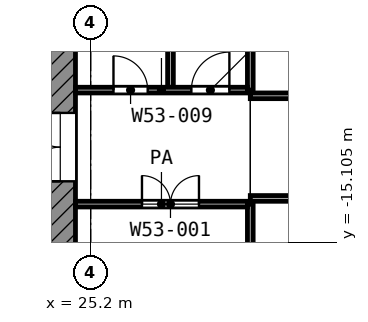
"""IFC4 building model, lengths in metres.
Left out: names, types, materials, properties, quantities, classifications, styles, units other than length and angle.
Written with IfcOpenShell. Run it as: python <this file> out.ifc"""

import sys

from ifc_helpers import new_model, si_unit, direction, frame, frame_2d, origin, place, context, subcontext, project, spatial, rectangle, extrude, element, fill, save


model = new_model("IFC4")
c1 = context("Model", 3, precision=1e-05, world=origin(), true_north=direction((0.0, 1.0)))
c2 = subcontext(c1, "Body", "Model", "MODEL_VIEW")
j1 = project(units=[si_unit("LENGTHUNIT", "METRE"), si_unit("PLANEANGLEUNIT", "RADIAN")], contexts=[c1])
p1 = place(None, origin())
s1 = spatial("IfcSite", under=j1, at=p1, CompositionType="ELEMENT")
p2 = place(p1, origin())
s2 = spatial("IfcBuilding", under=s1, at=p2, CompositionType="ELEMENT")
p3 = place(p2, frame((0.0, 0.0, 251.6)))
s3 = spatial("IfcBuildingStorey", under=s2, at=p3, CompositionType="ELEMENT", Elevation=251.6)
p4 = place(p3, frame((24.4, -24.0, 0.0), z_axis=(0.0, 0.0, 1.0), x_axis=(0.0, 1.0, 0.0)))
e1 = element("IfcWall", 1, at=p4, inside=s3, PredefinedType="SHEAR", context=c2, shape_type="SweptSolid", body=[
    extrude(rectangle(XDim=18.6, YDim=0.8, at=frame_2d((9.3, 0.0))), origin(), (0.0, 0.0, 1.0), 3.6),
])
p5 = place(p4, frame((10.5, 0.0, 0.0)))
e2 = element("IfcOpeningElement", 2, at=p5, cuts=e1, PredefinedType="OPENING", context=c2, shape_type="SweptSolid", body=[
    extrude(rectangle(XDim=1.8, YDim=2.1, at=frame_2d((0.9, 1.05))), frame((0.0, 0.41, 0.0), z_axis=(0.0, -1.0, 0.0), x_axis=(1.0, 0.0, 0.0)), (0.0, 0.0, 1.0), 0.82),
])
p6 = place(p3, frame((24.8, -14.1, 0.0), z_axis=(0.0, 0.0, 1.0), x_axis=(1.0, 0.0, 0.0)))
e3 = element("IfcWall", 3, at=p6, inside=s3, PredefinedType="PARTITIONING", context=c2, shape_type="SweptSolid", body=[
    extrude(rectangle(XDim=4.525, YDim=0.15, at=frame_2d((2.262, 0.0))), origin(), (0.0, 0.0, 1.0), 3.6),
])
p7 = place(p6, frame((1.75, 0.0, 0.0)))
e4 = element("IfcOpeningElement", 4, at=p7, cuts=e3, PredefinedType="OPENING", context=c2, shape_type="SweptSolid", body=[
    extrude(rectangle(XDim=1.5, YDim=2.1, at=frame_2d((0.75, 1.05))), frame((0.0, 0.085, 0.0), z_axis=(0.0, -1.0, 0.0), x_axis=(1.0, 0.0, 0.0)), (0.0, 0.0, 1.0), 0.17),
])
p8 = place(p3, frame((29.4, -13.95, 0.0), z_axis=(0.0, 0.0, 1.0), x_axis=(1.0, 0.0, 0.0)))
e5 = element("IfcWall", 5, at=p8, inside=s3, PredefinedType="PARTITIONING", context=c2, shape_type="SweptSolid", body=[
    extrude(rectangle(XDim=33.52, YDim=0.15, at=frame_2d((16.76, 0.0))), origin(), (0.0, 0.0, 1.0), 2.7),
])
p9 = place(p8, frame((1.5, 0.0, 0.0)))
e6 = element("IfcOpeningElement", 6, at=p9, cuts=e5, PredefinedType="OPENING", context=c2, shape_type="SweptSolid", body=[
    extrude(rectangle(XDim=1.2, YDim=2.1, at=frame_2d((0.6, 1.05))), frame((0.0, 0.085, 0.0), z_axis=(0.0, -1.0, 0.0), x_axis=(1.0, 0.0, 0.0)), (0.0, 0.0, 1.0), 0.17),
])
p10 = place(p8, frame((6.1, 0.0, 0.0)))
e7 = element("IfcOpeningElement", 7, at=p10, cuts=e5, PredefinedType="OPENING", context=c2, shape_type="SweptSolid", body=[
    extrude(rectangle(XDim=1.0, YDim=2.1, at=frame_2d((0.5, 1.05))), frame((0.0, 0.085, 0.0), z_axis=(0.0, -1.0, 0.0), x_axis=(1.0, 0.0, 0.0)), (0.0, 0.0, 1.0), 0.17),
])
p11 = place(p8, frame((11.3, 0.0, 0.0)))
e8 = element("IfcOpeningElement", 8, at=p11, cuts=e5, PredefinedType="OPENING", context=c2, shape_type="SweptSolid", body=[
    extrude(rectangle(XDim=1.1, YDim=2.1, at=frame_2d((0.55, 1.05))), frame((0.0, 0.085, 0.0), z_axis=(0.0, -1.0, 0.0), x_axis=(1.0, 0.0, 0.0)), (0.0, 0.0, 1.0), 0.17),
])
p12 = place(p8, frame((13.0, 0.0, 0.0)))
e9 = element("IfcOpeningElement", 9, at=p12, cuts=e5, PredefinedType="OPENING", context=c2, shape_type="SweptSolid", body=[
    extrude(rectangle(XDim=1.2, YDim=2.1, at=frame_2d((0.6, 1.05))), frame((0.0, 0.085, 0.0), z_axis=(0.0, -1.0, 0.0), x_axis=(1.0, 0.0, 0.0)), (0.0, 0.0, 1.0), 0.17),
])
p13 = place(p8, frame((22.6, 0.0, 0.0)))
e10 = element("IfcOpeningElement", 10, at=p13, cuts=e5, PredefinedType="OPENING", context=c2, shape_type="SweptSolid", body=[
    extrude(rectangle(XDim=1.2, YDim=2.1, at=frame_2d((0.6, 1.05))), frame((0.0, 0.085, 0.0), z_axis=(0.0, -1.0, 0.0), x_axis=(1.0, 0.0, 0.0)), (0.0, 0.0, 1.0), 0.17),
])
p14 = place(p8, frame((20.3, 0.0, 0.0)))
e11 = element("IfcOpeningElement", 11, at=p14, cuts=e5, PredefinedType="OPENING", context=c2, shape_type="SweptSolid", body=[
    extrude(rectangle(XDim=1.2, YDim=2.1, at=frame_2d((0.6, 1.05))), frame((0.0, 0.085, 0.0), z_axis=(0.0, -1.0, 0.0), x_axis=(1.0, 0.0, 0.0)), (0.0, 0.0, 1.0), 0.17),
])
p15 = place(p8, frame((28.0, 0.0, 0.0)))
e12 = element("IfcOpeningElement", 12, at=p15, cuts=e5, PredefinedType="OPENING", context=c2, shape_type="SweptSolid", body=[
    extrude(rectangle(XDim=1.2, YDim=2.1, at=frame_2d((0.6, 1.05))), frame((0.0, 0.085, 0.0), z_axis=(0.0, -1.0, 0.0), x_axis=(1.0, 0.0, 0.0)), (0.0, 0.0, 1.0), 0.17),
])
p16 = place(p8, frame((31.0, 0.0, 0.0)))
e13 = element("IfcOpeningElement", 13, at=p16, cuts=e5, PredefinedType="OPENING", context=c2, shape_type="SweptSolid", body=[
    extrude(rectangle(XDim=1.0, YDim=2.1, at=frame_2d((0.5, 1.05))), frame((0.0, 0.085, 0.0), z_axis=(0.0, -1.0, 0.0), x_axis=(1.0, 0.0, 0.0)), (0.0, 0.0, 1.0), 0.17),
])
p17 = place(p3, frame((29.4, -11.25, 0.0), z_axis=(0.0, 0.0, 1.0), x_axis=(1.0, 0.0, 0.0)))
e14 = element("IfcWall", 14, at=p17, inside=s3, PredefinedType="PARTITIONING", context=c2, shape_type="SweptSolid", body=[
    extrude(rectangle(XDim=10.832, YDim=0.15, at=frame_2d((5.416, 0.0))), origin(), (0.0, 0.0, 1.0), 3.6),
])
p18 = place(p17, frame((4.4, 0.0, 0.0)))
e15 = element("IfcOpeningElement", 15, at=p18, cuts=e14, PredefinedType="OPENING", context=c2, shape_type="SweptSolid", body=[
    extrude(rectangle(XDim=1.2, YDim=2.1, at=frame_2d((0.6, 1.05))), frame((0.0, 0.085, 0.0), z_axis=(0.0, -1.0, 0.0), x_axis=(1.0, 0.0, 0.0)), (0.0, 0.0, 1.0), 0.17),
])
p19 = place(p17, frame((1.5, 0.0, 0.0)))
e16 = element("IfcOpeningElement", 16, at=p19, cuts=e14, PredefinedType="OPENING", context=c2, shape_type="SweptSolid", body=[
    extrude(rectangle(XDim=1.2, YDim=2.1, at=frame_2d((0.6, 1.05))), frame((0.0, 0.085, 0.0), z_axis=(0.0, -1.0, 0.0), x_axis=(1.0, 0.0, 0.0)), (0.0, 0.0, 1.0), 0.17),
])
p20 = place(p3, frame((24.8, -11.1, 0.0), z_axis=(0.0, 0.0, 1.0), x_axis=(1.0, 0.0, 0.0)))
e17 = element("IfcWall", 17, at=p20, inside=s3, PredefinedType="PARTITIONING", context=c2, shape_type="SweptSolid", body=[
    extrude(rectangle(XDim=4.525, YDim=0.15, at=frame_2d((2.262, 0.0))), origin(), (0.0, 0.0, 1.0), 3.6),
])
p21 = place(p20, frame((1.0, 0.0, 0.0)))
e18 = element("IfcOpeningElement", 18, at=p21, cuts=e17, PredefinedType="OPENING", context=c2, shape_type="SweptSolid", body=[
    extrude(rectangle(XDim=0.9, YDim=2.1, at=frame_2d((0.45, 1.05))), frame((0.0, 0.085, 0.0), z_axis=(0.0, -1.0, 0.0), x_axis=(1.0, 0.0, 0.0)), (0.0, 0.0, 1.0), 0.17),
])
p22 = place(p20, frame((3.05, 0.0, 0.0)))
e19 = element("IfcOpeningElement", 19, at=p22, cuts=e17, PredefinedType="OPENING", context=c2, shape_type="SweptSolid", body=[
    extrude(rectangle(XDim=1.0, YDim=2.1, at=frame_2d((0.5, 1.05))), frame((0.0, 0.085, 0.0), z_axis=(0.0, -1.0, 0.0), x_axis=(1.0, 0.0, 0.0)), (0.0, 0.0, 1.0), 0.17),
])
p23 = place(p3, frame((27.3, -11.025, 0.0), z_axis=(0.0, 0.0, 1.0), x_axis=(0.0, 1.0, 0.0)))
e20 = element("IfcWall", 20, at=p23, inside=s3, PredefinedType="PARTITIONING", context=c2, shape_type="SweptSolid", body=[
    extrude(rectangle(XDim=10.945, YDim=0.15, at=frame_2d((5.472, 0.0))), origin(), (0.0, 0.0, 1.0), 3.6),
])
p24 = place(p3, frame((29.4, -25.2, 0.0), z_axis=(0.0, 0.0, 1.0), x_axis=(0.0, 1.0, 0.0)))
e21 = element("IfcWall", 21, at=p24, inside=s3, PredefinedType="PARTITIONING", context=c2, shape_type="SweptSolid", body=[
    extrude(rectangle(XDim=11.1, YDim=0.15, at=frame_2d((5.55, 0.0))), origin(), (0.0, 0.0, 1.0), 3.6),
])
p25 = place(p3, frame((29.4, -11.1, 0.0), z_axis=(0.0, 0.0, 1.0), x_axis=(0.0, 1.0, 0.0)))
e22 = element("IfcWall", 22, at=p25, inside=s3, PredefinedType="PARTITIONING", context=c2, shape_type="SweptSolid", body=[
    extrude(rectangle(XDim=11.02, YDim=0.15, at=frame_2d((5.51, 0.0))), origin(), (0.0, 0.0, 1.0), 3.6),
])
p26 = place(p5, origin())
e23 = element("IfcDoor", 23, at=p26, inside=s3, OperationType="DOUBLE_DOOR_SINGLE_SWING", PredefinedType="DOOR", context=c2, shape_type="SweptSolid", body=[
    extrude(rectangle(XDim=1.8, YDim=2.1, at=frame_2d((0.9, 1.05))), frame((0.0, 0.025, 0.0), z_axis=(0.0, -1.0, 0.0), x_axis=(1.0, 0.0, 0.0)), (0.0, 0.0, 1.0), 0.05),
])
fill(e2, e23)
p27 = place(p7, origin())
e24 = element("IfcDoor", 24, at=p27, inside=s3, OperationType="DOUBLE_DOOR_SINGLE_SWING", PredefinedType="DOOR", context=c2, shape_type="SweptSolid", body=[
    extrude(rectangle(XDim=1.5, YDim=2.1, at=frame_2d((0.75, 1.05))), frame((0.0, 0.025, 0.0), z_axis=(0.0, -1.0, 0.0), x_axis=(1.0, 0.0, 0.0)), (0.0, 0.0, 1.0), 0.05),
])
fill(e4, e24)
p28 = place(p21, origin())
e25 = element("IfcDoor", 25, at=p28, inside=s3, OperationType="SINGLE_SWING_LEFT", PredefinedType="DOOR", context=c2, shape_type="SweptSolid", body=[
    extrude(rectangle(XDim=0.9, YDim=2.1, at=frame_2d((0.45, 1.05))), frame((0.0, 0.025, 0.0), z_axis=(0.0, -1.0, 0.0), x_axis=(1.0, 0.0, 0.0)), (0.0, 0.0, 1.0), 0.05),
])
fill(e18, e25)
p29 = place(p22, origin())
e26 = element("IfcDoor", 26, at=p29, inside=s3, OperationType="SINGLE_SWING_RIGHT", PredefinedType="DOOR", context=c2, shape_type="SweptSolid", body=[
    extrude(rectangle(XDim=1.0, YDim=2.1, at=frame_2d((0.5, 1.05))), frame((0.0, 0.025, 0.0), z_axis=(0.0, -1.0, 0.0), x_axis=(1.0, 0.0, 0.0)), (0.0, 0.0, 1.0), 0.05),
])
fill(e19, e26)
save(model, sys.argv[1])
